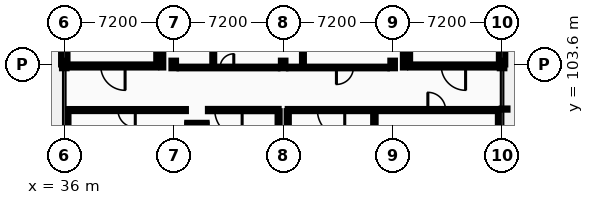
"""IFC4 building model, lengths in metres.
Left out: names, types, materials, properties, quantities, classifications, styles, units other than length and angle.
Written with IfcOpenShell. Run it as: python <this file> out.ifc"""

import sys

from ifc_helpers import new_model, si_unit, direction, frame, frame_2d, origin, origin_2d, place, context, subcontext, project, spatial, rectangle, i_section, extrude, element, fill, save


model = new_model("IFC4")
c1 = context("Model", 3, precision=1e-05, world=origin(), true_north=direction((0.0, 1.0)))
c2 = subcontext(c1, "Body", "Model", "MODEL_VIEW")
j1 = project(units=[si_unit("LENGTHUNIT", "METRE"), si_unit("PLANEANGLEUNIT", "RADIAN")], contexts=[c1])
p1 = place(None, origin())
s1 = spatial("IfcSite", under=j1, at=p1, CompositionType="ELEMENT")
p2 = place(p1, origin())
s2 = spatial("IfcBuilding", under=s1, at=p2, CompositionType="ELEMENT")
p3 = place(p2, origin())
s3 = spatial("IfcBuildingStorey", under=s2, at=p3, CompositionType="ELEMENT", Elevation=0.0)
for number, where, z_axis, x_axis in (
    (1, (36.0, 103.6, 0.0), (0.0, 0.0, 1.0), (1.0, 0.0, 0.0)),
    (2, (43.2, 103.6, 0.0), (0.0, 0.0, 1.0), (1.0, 0.0, 0.0)),
    (3, (50.4, 103.6, 0.0), (0.0, 0.0, 1.0), (1.0, 0.0, 0.0)),
    (4, (57.6, 103.6, 0.0), (0.0, 0.0, 1.0), (1.0, 0.0, 0.0)),
    (5, (64.8, 103.6, 0.0), (0.0, 0.0, 1.0), (1.0, 0.0, 0.0)),
):
    element("IfcColumn", number, at=place(p3, frame(where, z_axis=z_axis, x_axis=x_axis)), inside=s3, PredefinedType="COLUMN", context=c2, shape_type="SweptSolid", body=[
        extrude(i_section(OverallWidth=0.3, OverallDepth=0.5, WebThickness=0.014, FlangeThickness=0.028, FilletRadius=0.027, at=origin_2d()), origin(), (0.0, 0.0, 1.0), 5.2),
    ])
p4 = place(p3, frame((36.0, 106.8, 0.0), z_axis=(0.0, 0.0, 1.0), x_axis=(0.0, -1.0, 0.0)))
e6 = element("IfcWall", 6, at=p4, inside=s3, PredefinedType="STANDARD", context=c2, shape_type="SweptSolid", body=[
    extrude(rectangle(XDim=3.2, YDim=0.42, at=frame_2d((1.6, 0.0))), origin(), (0.0, 0.0, 1.0), 4.97),
])
p5 = place(p4, frame((1.153, 0.0, 0.95)))
e7 = element("IfcOpeningElement", 7, at=p5, cuts=e6, PredefinedType="OPENING", context=c2, shape_type="SweptSolid", body=[
    extrude(rectangle(XDim=0.894, YDim=1.368, at=frame_2d((0.447, 0.684))), frame((0.0, 0.22, 0.0), z_axis=(0.0, -1.0, 0.0), x_axis=(1.0, 0.0, 0.0)), (0.0, 0.0, 1.0), 0.44),
])
p6 = place(p3, frame((64.8, 103.6, 0.0), z_axis=(0.0, 0.0, 1.0), x_axis=(0.0, 1.0, 0.0)))
e8 = element("IfcWall", 8, at=p6, inside=s3, PredefinedType="STANDARD", context=c2, shape_type="SweptSolid", body=[
    extrude(rectangle(XDim=3.2, YDim=0.42, at=frame_2d((1.6, 0.0))), origin(), (0.0, 0.0, 1.0), 4.97),
])
p7 = place(p6, frame((1.102, 0.0, 0.95)))
e9 = element("IfcOpeningElement", 9, at=p7, cuts=e8, PredefinedType="OPENING", context=c2, shape_type="SweptSolid", body=[
    extrude(rectangle(XDim=0.996, YDim=1.368, at=frame_2d((0.498, 0.684))), frame((0.0, 0.22, 0.0), z_axis=(0.0, -1.0, 0.0), x_axis=(1.0, 0.0, 0.0)), (0.0, 0.0, 1.0), 0.44),
])
p8 = place(p3, frame((36.35, 103.5, 0.0), z_axis=(0.0, 0.0, 1.0), x_axis=(1.0, 0.0, 0.0)))
e10 = element("IfcWall", 10, at=p8, inside=s3, PredefinedType="PARTITIONING", context=c2, shape_type="SweptSolid", body=[
    extrude(rectangle(XDim=5.7, YDim=0.2, at=frame_2d((2.85, 0.0))), origin(), (0.0, 0.0, 1.0), 4.665),
])
p9 = place(p8, frame((2.05, 0.0, 0.0)))
e11 = element("IfcOpeningElement", 11, at=p9, cuts=e10, PredefinedType="OPENING", context=c2, shape_type="SweptSolid", body=[
    extrude(rectangle(XDim=1.6, YDim=2.2, at=frame_2d((0.8, 1.1))), frame((0.0, 0.11, 0.0), z_axis=(0.0, -1.0, 0.0), x_axis=(1.0, 0.0, 0.0)), (0.0, 0.0, 1.0), 0.22),
])
p10 = place(p3, frame((42.15, 103.6, 0.0), z_axis=(0.0, 0.0, 1.0), x_axis=(0.0, 1.0, 0.0)))
e12 = element("IfcWall", 12, at=p10, inside=s3, PredefinedType="PARTITIONING", context=c2, shape_type="SweptSolid", body=[
    extrude(rectangle(XDim=3.2, YDim=0.2, at=frame_2d((1.6, 0.0))), origin(), (0.0, 0.0, 1.0), 4.97),
])
p11 = place(p3, frame((58.75, 103.5, 0.0), z_axis=(0.0, 0.0, 1.0), x_axis=(1.0, 0.0, 0.0)))
e13 = element("IfcWall", 13, at=p11, inside=s3, PredefinedType="PARTITIONING", context=c2, shape_type="SweptSolid", body=[
    extrude(rectangle(XDim=5.7, YDim=0.2, at=frame_2d((2.85, 0.0))), origin(), (0.0, 0.0, 1.0), 4.665),
])
p12 = place(p11, frame((2.05, 0.0, 0.0)))
e14 = element("IfcOpeningElement", 14, at=p12, cuts=e13, PredefinedType="OPENING", context=c2, shape_type="SweptSolid", body=[
    extrude(rectangle(XDim=1.6, YDim=2.2, at=frame_2d((0.8, 1.1))), frame((0.0, 0.11, 0.0), z_axis=(0.0, -1.0, 0.0), x_axis=(1.0, 0.0, 0.0)), (0.0, 0.0, 1.0), 0.22),
])
p13 = place(p3, frame((58.65, 103.6, 0.0), z_axis=(0.0, 0.0, 1.0), x_axis=(0.0, 1.0, 0.0)))
e15 = element("IfcWall", 15, at=p13, inside=s3, PredefinedType="PARTITIONING", context=c2, shape_type="SweptSolid", body=[
    extrude(rectangle(XDim=3.2, YDim=0.2, at=frame_2d((1.6, 0.0))), origin(), (0.0, 0.0, 1.0), 4.97),
])
p14 = place(p3, frame((44.09, 99.705, 0.0), z_axis=(0.0, 0.0, 1.0), x_axis=(1.0, 0.0, 0.0)))
e16 = element("IfcWall", 16, at=p14, inside=s3, PredefinedType="PARTITIONING", context=c2, shape_type="SweptSolid", body=[
    extrude(rectangle(XDim=1.27, YDim=0.11, at=frame_2d((0.635, 0.0))), origin(), (0.0, 0.0, 1.0), 4.97),
])
for number, where, z_axis, x_axis in (
    (17, (44.145, 98.6, 0.0), (0.0, 0.0, 1.0), (0.0, 1.0, 0.0)),
    (18, (45.305, 98.6, 0.0), (0.0, 0.0, 1.0), (0.0, 1.0, 0.0)),
):
    element("IfcWall", number, at=place(p3, frame(where, z_axis=z_axis, x_axis=x_axis)), inside=s3, PredefinedType="PARTITIONING", context=c2, shape_type="SweptSolid", body=[
        extrude(rectangle(XDim=1.05, YDim=0.11, at=frame_2d((0.525, 0.0))), origin(), (0.0, 0.0, 1.0), 4.97),
    ])
p15 = place(p3, frame((36.2, 100.6, 0.0), z_axis=(0.0, 0.0, 1.0), x_axis=(1.0, 0.0, 0.0)))
e19 = element("IfcWall", 19, at=p15, inside=s3, PredefinedType="PARTITIONING", context=c2, shape_type="SweptSolid", body=[
    extrude(rectangle(XDim=7.8, YDim=0.135, at=frame_2d((3.9, 0.0))), origin(), (0.0, 0.0, 1.0), 4.97),
])
p16 = place(p15, frame((3.33, 0.0, 0.0)))
e20 = element("IfcOpeningElement", 20, at=p16, cuts=e19, PredefinedType="OPENING", context=c2, shape_type="SweptSolid", body=[
    extrude(rectangle(XDim=1.14, YDim=2.096, at=frame_2d((0.57, 1.048))), frame((0.0, 0.078, 0.0), z_axis=(0.0, -1.0, 0.0), x_axis=(1.0, 0.0, 0.0)), (0.0, 0.0, 1.0), 0.155),
])
p17 = place(p3, frame((45.45, 100.6, 0.0), z_axis=(0.0, 0.0, 1.0), x_axis=(1.0, 0.0, 0.0)))
e21 = element("IfcWall", 21, at=p17, inside=s3, PredefinedType="PARTITIONING", context=c2, shape_type="SweptSolid", body=[
    extrude(rectangle(XDim=4.65, YDim=0.15, at=frame_2d((2.325, 0.0))), origin(), (0.0, 0.0, 1.0), 4.97),
])
p18 = place(p17, frame((0.45, 0.0, 0.0)))
e22 = element("IfcOpeningElement", 22, at=p18, cuts=e21, PredefinedType="OPENING", context=c2, shape_type="SweptSolid", body=[
    extrude(rectangle(XDim=1.8, YDim=2.3, at=frame_2d((0.9, 1.15))), frame((0.0, 0.085, 0.0), z_axis=(0.0, -1.0, 0.0), x_axis=(1.0, 0.0, 0.0)), (0.0, 0.0, 1.0), 0.17),
])
p19 = place(p3, frame((50.7, 100.6, 0.0), z_axis=(0.0, 0.0, 1.0), x_axis=(1.0, 0.0, 0.0)))
e23 = element("IfcWall", 23, at=p19, inside=s3, PredefinedType="PARTITIONING", context=c2, shape_type="SweptSolid", body=[
    extrude(rectangle(XDim=13.9, YDim=0.142, at=frame_2d((6.95, 0.0))), origin(), (0.0, 0.0, 1.0), 4.97),
])
p20 = place(p19, frame((1.95, 0.0, 0.0)))
e24 = element("IfcOpeningElement", 24, at=p20, cuts=e23, PredefinedType="OPENING", context=c2, shape_type="SweptSolid", body=[
    extrude(rectangle(XDim=1.8, YDim=2.3, at=frame_2d((0.9, 1.15))), frame((0.0, 0.081, 0.0), z_axis=(0.0, -1.0, 0.0), x_axis=(1.0, 0.0, 0.0)), (0.0, 0.0, 1.0), 0.162),
])
p21 = place(p19, frame((9.217, 0.0, 0.0)))
e25 = element("IfcOpeningElement", 25, at=p21, cuts=e23, PredefinedType="OPENING", context=c2, shape_type="SweptSolid", body=[
    extrude(rectangle(XDim=1.166, YDim=2.096, at=frame_2d((0.583, 1.048))), frame((0.0, 0.081, 0.0), z_axis=(0.0, -1.0, 0.0), x_axis=(1.0, 0.0, 0.0)), (0.0, 0.0, 1.0), 0.162),
])
p22 = place(p3, frame((43.58, 103.4, 0.0), z_axis=(0.0, 0.0, 1.0), x_axis=(1.0, 0.0, 0.0)))
e26 = element("IfcWall", 26, at=p22, inside=s3, PredefinedType="PARTITIONING", context=c2, shape_type="SweptSolid", body=[
    extrude(rectangle(XDim=6.44, YDim=0.11, at=frame_2d((3.22, 0.0))), origin(), (0.0, 0.0, 1.0), 4.665),
])
p23 = place(p22, frame((0.61, 0.0, 0.0)))
e27 = element("IfcOpeningElement", 27, at=p23, cuts=e26, PredefinedType="OPENING", context=c2, shape_type="SweptSolid", body=[
    extrude(rectangle(XDim=1.0, YDim=2.1, at=frame_2d((0.5, 1.05))), frame((0.0, 0.065, 0.0), z_axis=(0.0, -1.0, 0.0), x_axis=(1.0, 0.0, 0.0)), (0.0, 0.0, 1.0), 0.13),
])
p24 = place(p22, frame((2.67, 0.0, 0.0)))
e28 = element("IfcOpeningElement", 28, at=p24, cuts=e26, PredefinedType="OPENING", context=c2, shape_type="SweptSolid", body=[
    extrude(rectangle(XDim=0.9, YDim=2.1, at=frame_2d((0.45, 1.05))), frame((0.0, 0.065, 0.0), z_axis=(0.0, -1.0, 0.0), x_axis=(1.0, 0.0, 0.0)), (0.0, 0.0, 1.0), 0.13),
])
p25 = place(p3, frame((50.78, 103.4, 0.0), z_axis=(0.0, 0.0, 1.0), x_axis=(1.0, 0.0, 0.0)))
e29 = element("IfcWall", 29, at=p25, inside=s3, PredefinedType="PARTITIONING", context=c2, shape_type="SweptSolid", body=[
    extrude(rectangle(XDim=6.44, YDim=0.11, at=frame_2d((3.22, 0.0))), origin(), (0.0, 0.0, 1.0), 4.665),
])
p26 = place(p25, frame((3.123, 0.0, 0.0)))
e30 = element("IfcOpeningElement", 30, at=p26, cuts=e29, PredefinedType="OPENING", context=c2, shape_type="SweptSolid", body=[
    extrude(rectangle(XDim=1.114, YDim=2.096, at=frame_2d((0.557, 1.048))), frame((0.0, 0.065, 0.0), z_axis=(0.0, -1.0, 0.0), x_axis=(1.0, 0.0, 0.0)), (0.0, 0.0, 1.0), 0.13),
])
p27 = place(p3, frame((36.2, 96.78, 0.0), z_axis=(0.0, 0.0, 1.0), x_axis=(0.0, 1.0, 0.0)))
e31 = element("IfcWall", 31, at=p27, inside=s3, PredefinedType="PARTITIONING", context=c2, shape_type="SweptSolid", body=[
    extrude(rectangle(XDim=3.752, YDim=0.15, at=frame_2d((1.876, 0.0))), origin(), (0.0, 0.0, 1.0), 4.595),
])
p28 = place(p3, frame((42.45, 103.4, 0.0), z_axis=(0.0, 0.0, 1.0), x_axis=(0.0, 1.0, 0.0)))
e32 = element("IfcWall", 32, at=p28, inside=s3, PredefinedType="PARTITIONING", context=c2, shape_type="SweptSolid", body=[
    extrude(rectangle(XDim=3.225, YDim=0.125, at=frame_2d((1.613, 0.0))), origin(), (0.0, 0.0, 1.0), 4.97),
])
p29 = place(p3, frame((45.8, 103.455, 0.0), z_axis=(0.0, 0.0, 1.0), x_axis=(0.0, 1.0, 0.0)))
e33 = element("IfcWall", 33, at=p29, inside=s3, PredefinedType="PARTITIONING", context=c2, shape_type="SweptSolid", body=[
    extrude(rectangle(XDim=14.345, YDim=0.125, at=frame_2d((7.172, 0.0))), origin(), (0.0, 0.0, 1.0), 4.655),
])
p30 = place(p3, frame((50.1, 96.78, 0.0), z_axis=(0.0, 0.0, 1.0), x_axis=(0.0, 1.0, 0.0)))
e34 = element("IfcWall", 34, at=p30, inside=s3, PredefinedType="PARTITIONING", context=c2, shape_type="SweptSolid", body=[
    extrude(rectangle(XDim=3.745, YDim=0.135, at=frame_2d((1.873, 0.0))), origin(), (0.0, 0.0, 1.0), 4.97),
])
p31 = place(p3, frame((50.7, 96.78, 0.0), z_axis=(0.0, 0.0, 1.0), x_axis=(0.0, 1.0, 0.0)))
e35 = element("IfcWall", 35, at=p31, inside=s3, PredefinedType="PARTITIONING", context=c2, shape_type="SweptSolid", body=[
    extrude(rectangle(XDim=3.749, YDim=0.142, at=frame_2d((1.875, 0.0))), origin(), (0.0, 0.0, 1.0), 4.665),
])
p32 = place(p3, frame((51.7, 103.455, 0.0), z_axis=(0.0, 0.0, 1.0), x_axis=(0.0, 1.0, 0.0)))
e36 = element("IfcWall", 36, at=p32, inside=s3, PredefinedType="PARTITIONING", context=c2, shape_type="SweptSolid", body=[
    extrude(rectangle(XDim=14.345, YDim=0.125, at=frame_2d((7.172, 0.0))), origin(), (0.0, 0.0, 1.0), 4.97),
])
p33 = place(p3, frame((56.4, 82.271, 0.0), z_axis=(0.0, 0.0, 1.0), x_axis=(0.0, 1.0, 0.0)))
e37 = element("IfcWall", 37, at=p33, inside=s3, PredefinedType="PARTITIONING", context=c2, shape_type="SweptSolid", body=[
    extrude(rectangle(XDim=18.258, YDim=0.16, at=frame_2d((9.129, 0.0))), origin(), (0.0, 0.0, 1.0), 4.97),
])
p34 = place(p3, frame((58.35, 103.4, 0.0), z_axis=(0.0, 0.0, 1.0), x_axis=(0.0, 1.0, 0.0)))
e38 = element("IfcWall", 38, at=p34, inside=s3, PredefinedType="PARTITIONING", context=c2, shape_type="SweptSolid", body=[
    extrude(rectangle(XDim=3.225, YDim=0.15, at=frame_2d((1.613, 0.0))), origin(), (0.0, 0.0, 1.0), 4.97),
])
p35 = place(p3, frame((64.6, 96.78, 0.0), z_axis=(0.0, 0.0, 1.0), x_axis=(0.0, 1.0, 0.0)))
e39 = element("IfcWall", 39, at=p35, inside=s3, PredefinedType="PARTITIONING", context=c2, shape_type="SweptSolid", body=[
    extrude(rectangle(XDim=3.749, YDim=0.15, at=frame_2d((1.875, 0.0))), origin(), (0.0, 0.0, 1.0), 4.595),
])
p36 = place(p9, origin())
e40 = element("IfcDoor", 40, at=p36, inside=s3, OperationType="DOUBLE_DOOR_SINGLE_SWING", PredefinedType="DOOR", context=c2, shape_type="SweptSolid", body=[
    extrude(rectangle(XDim=1.6, YDim=2.2, at=frame_2d((0.8, 1.1))), frame((0.0, 0.025, 0.0), z_axis=(0.0, -1.0, 0.0), x_axis=(1.0, 0.0, 0.0)), (0.0, 0.0, 1.0), 0.05),
])
fill(e11, e40)
p37 = place(p12, origin())
e41 = element("IfcDoor", 41, at=p37, inside=s3, OperationType="DOUBLE_DOOR_SINGLE_SWING", PredefinedType="DOOR", context=c2, shape_type="SweptSolid", body=[
    extrude(rectangle(XDim=1.6, YDim=2.2, at=frame_2d((0.8, 1.1))), frame((0.0, 0.025, 0.0), z_axis=(0.0, -1.0, 0.0), x_axis=(1.0, 0.0, 0.0)), (0.0, 0.0, 1.0), 0.05),
])
fill(e14, e41)
p38 = place(p23, frame((1.0, 0.0, 0.0), z_axis=(0.0, 0.0, 1.0), x_axis=(-1.0, 0.0, 0.0)))
e42 = element("IfcDoor", 42, at=p38, inside=s3, OperationType="SLIDING_TO_LEFT", PredefinedType="DOOR", context=c2, shape_type="SweptSolid", body=[
    extrude(rectangle(XDim=1.0, YDim=2.1, at=frame_2d((0.5, 1.05))), frame((0.0, 0.025, 0.0), z_axis=(0.0, -1.0, 0.0), x_axis=(1.0, 0.0, 0.0)), (0.0, 0.0, 1.0), 0.05),
])
fill(e27, e42)
p39 = place(p24, frame((0.9, 0.0, 0.0), z_axis=(0.0, 0.0, 1.0), x_axis=(-1.0, 0.0, 0.0)))
e43 = element("IfcDoor", 43, at=p39, inside=s3, OperationType="SINGLE_SWING_RIGHT", PredefinedType="DOOR", context=c2, shape_type="SweptSolid", body=[
    extrude(rectangle(XDim=0.9, YDim=2.1, at=frame_2d((0.45, 1.05))), frame((0.0, 0.025, 0.0), z_axis=(0.0, -1.0, 0.0), x_axis=(1.0, 0.0, 0.0)), (0.0, 0.0, 1.0), 0.05),
])
fill(e28, e43)
p40 = place(p18, origin())
e44 = element("IfcDoor", 44, at=p40, inside=s3, OperationType="DOUBLE_DOOR_SINGLE_SWING", PredefinedType="DOOR", context=c2, shape_type="SweptSolid", body=[
    extrude(rectangle(XDim=1.8, YDim=2.3, at=frame_2d((0.9, 1.15))), frame((0.0, 0.025, 0.0), z_axis=(0.0, -1.0, 0.0), x_axis=(1.0, 0.0, 0.0)), (0.0, 0.0, 1.0), 0.05),
])
fill(e22, e44)
p41 = place(p26, frame((1.114, 0.0, 0.0), z_axis=(0.0, 0.0, 1.0), x_axis=(-1.0, 0.0, 0.0)))
e45 = element("IfcDoor", 45, at=p41, inside=s3, OperationType="SINGLE_SWING_LEFT", PredefinedType="DOOR", context=c2, shape_type="SweptSolid", body=[
    extrude(rectangle(XDim=1.114, YDim=2.096, at=frame_2d((0.557, 1.048))), frame((0.0, 0.025, 0.0), z_axis=(0.0, -1.0, 0.0), x_axis=(1.0, 0.0, 0.0)), (0.0, 0.0, 1.0), 0.05),
])
fill(e30, e45)
p42 = place(p20, origin())
e46 = element("IfcDoor", 46, at=p42, inside=s3, OperationType="DOUBLE_DOOR_SINGLE_SWING", PredefinedType="DOOR", context=c2, shape_type="SweptSolid", body=[
    extrude(rectangle(XDim=1.8, YDim=2.3, at=frame_2d((0.9, 1.15))), frame((0.0, 0.025, 0.0), z_axis=(0.0, -1.0, 0.0), x_axis=(1.0, 0.0, 0.0)), (0.0, 0.0, 1.0), 0.05),
])
fill(e24, e46)
p43 = place(p16, origin())
e47 = element("IfcDoor", 47, at=p43, inside=s3, OperationType="SINGLE_SWING_RIGHT", PredefinedType="DOOR", context=c2, shape_type="SweptSolid", body=[
    extrude(rectangle(XDim=1.14, YDim=2.096, at=frame_2d((0.57, 1.048))), frame((0.0, 0.025, 0.0), z_axis=(0.0, -1.0, 0.0), x_axis=(1.0, 0.0, 0.0)), (0.0, 0.0, 1.0), 0.05),
])
fill(e20, e47)
p44 = place(p21, origin())
e48 = element("IfcDoor", 48, at=p44, inside=s3, OperationType="SINGLE_SWING_LEFT", PredefinedType="DOOR", context=c2, shape_type="SweptSolid", body=[
    extrude(rectangle(XDim=1.166, YDim=2.096, at=frame_2d((0.583, 1.048))), frame((0.0, 0.025, 0.0), z_axis=(0.0, -1.0, 0.0), x_axis=(1.0, 0.0, 0.0)), (0.0, 0.0, 1.0), 0.05),
])
fill(e25, e48)
save(model, sys.argv[1])
